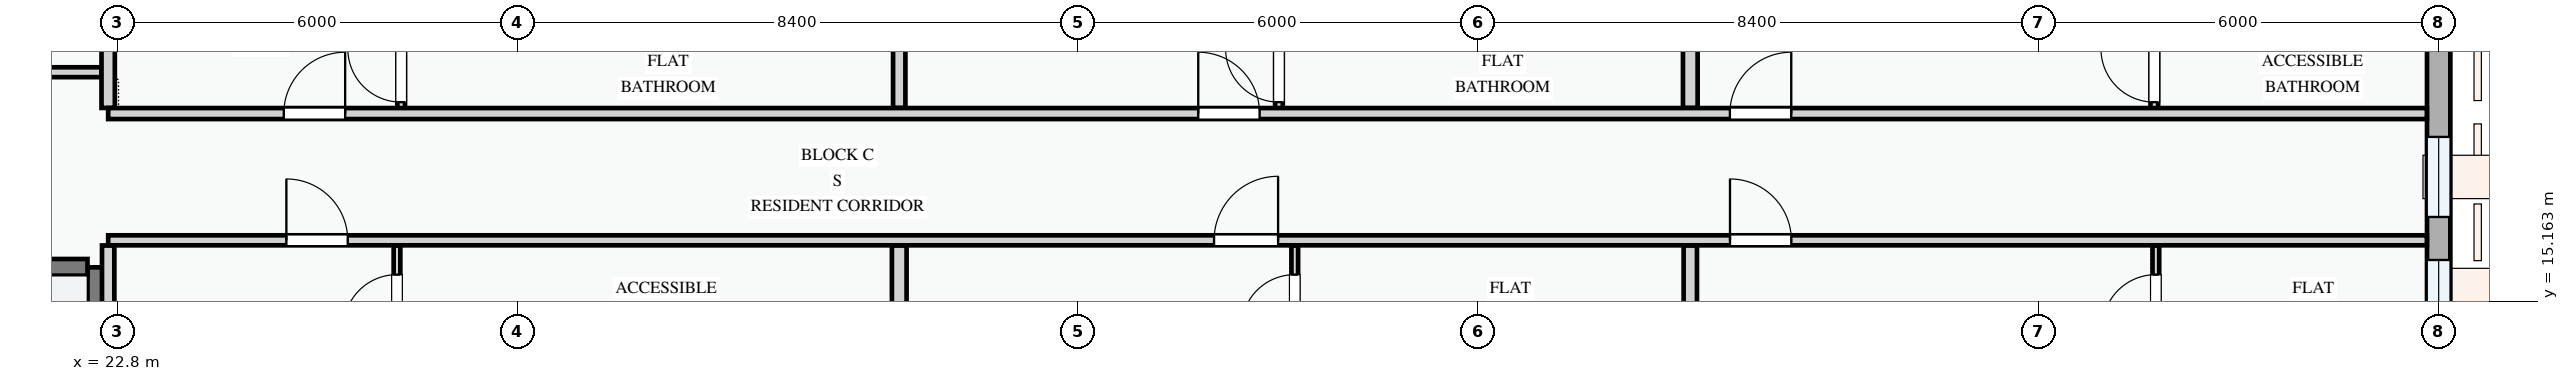
"""IFC4 building model, lengths in metres.
Left out: names, types, materials, properties, quantities, classifications, styles, units other than length and angle.
Written with IfcOpenShell. Run it as: python <this file> out.ifc"""

import sys

from ifc_helpers import new_model, si_unit, direction, frame, frame_2d, origin, place, context, subcontext, project, spatial, rectangle, extrude, element, fill, save


model = new_model("IFC4")
c1 = context("Model", 3, precision=1e-05, world=origin(), true_north=direction((0.0, 1.0)))
c2 = subcontext(c1, "Body", "Model", "MODEL_VIEW")
j1 = project(units=[si_unit("LENGTHUNIT", "METRE"), si_unit("PLANEANGLEUNIT", "RADIAN")], contexts=[c1])
p1 = place(None, origin())
s1 = spatial("IfcSite", under=j1, at=p1, CompositionType="ELEMENT")
p2 = place(p1, origin())
s2 = spatial("IfcBuilding", under=s1, at=p2, CompositionType="ELEMENT")
p3 = place(p2, frame((0.0, 0.0, 8.1)))
s3 = spatial("IfcBuildingStorey", under=s2, at=p3, CompositionType="ELEMENT", Elevation=8.1)
p4 = place(p3, frame((57.6, 14.4, 0.0), z_axis=(0.0, 0.0, 1.0), x_axis=(0.0, 1.0, 0.0)))
e1 = element("IfcWall", 1, at=p4, inside=s3, PredefinedType="STANDARD", context=c2, shape_type="SweptSolid", body=[
    extrude(rectangle(XDim=8.4, YDim=0.35, at=frame_2d((4.2, 0.0))), origin(), (0.0, 0.0, 1.0), 2.425),
])
p5 = place(p4, frame((0.485, 0.0, 0.78)))
e2 = element("IfcOpeningElement", 2, at=p5, cuts=e1, PredefinedType="OPENING", context=c2, shape_type="SweptSolid", body=[
    extrude(rectangle(XDim=0.9, YDim=1.2, at=frame_2d((0.45, 0.6))), frame((0.0, 0.185, 0.0), z_axis=(0.0, -1.0, 0.0), x_axis=(1.0, 0.0, 0.0)), (0.0, 0.0, 1.0), 0.37),
])
p6 = place(p4, frame((2.03, 0.0, 0.78)))
e3 = element("IfcOpeningElement", 3, at=p6, cuts=e1, PredefinedType="OPENING", context=c2, shape_type="SweptSolid", body=[
    extrude(rectangle(XDim=1.2, YDim=1.5, at=frame_2d((0.6, 0.75))), frame((0.0, 0.185, 0.0), z_axis=(0.0, -1.0, 0.0), x_axis=(1.0, 0.0, 0.0)), (0.0, 0.0, 1.0), 0.37),
])
p7 = place(p4, frame((6.658, 0.0, 0.78)))
e4 = element("IfcOpeningElement", 4, at=p7, cuts=e1, PredefinedType="OPENING", context=c2, shape_type="SweptSolid", body=[
    extrude(rectangle(XDim=0.95, YDim=1.15, at=frame_2d((0.475, 0.575))), frame((0.0, 0.185, 0.0), z_axis=(0.0, -1.0, 0.0), x_axis=(1.0, 0.0, 0.0)), (0.0, 0.0, 1.0), 0.37),
])
p8 = place(p3, frame((22.475, 8.75, 0.0), z_axis=(0.0, 0.0, 1.0), x_axis=(0.0, 1.0, 0.0)))
e5 = element("IfcWall", 5, at=p8, inside=s3, PredefinedType="SHEAR", context=c2, shape_type="SweptSolid", body=[
    extrude(rectangle(XDim=6.925, YDim=0.25, at=frame_2d((3.462, 0.0))), origin(), (0.0, 0.0, 1.0), 3.0),
])
p9 = place(p3, frame((8.85, 15.675, 0.0), z_axis=(0.0, 0.0, 1.0), x_axis=(1.0, 0.0, 0.0)))
e6 = element("IfcWall", 6, at=p9, inside=s3, PredefinedType="SHEAR", context=c2, shape_type="SweptSolid", body=[
    extrude(rectangle(XDim=13.5, YDim=0.25, at=frame_2d((6.75, 0.0))), origin(), (0.0, 0.0, 1.0), 3.0),
])
p10 = place(p9, frame((6.2, 0.0, 0.0)))
e7 = element("IfcOpeningElement", 7, at=p10, cuts=e6, PredefinedType="OPENING", context=c2, shape_type="SweptSolid", body=[
    extrude(rectangle(XDim=1.1, YDim=2.15, at=frame_2d((0.55, 1.075))), frame((0.0, 0.135, 0.0), z_axis=(0.0, -1.0, 0.0), x_axis=(1.0, 0.0, 0.0)), (0.0, 0.0, 1.0), 0.27),
])
p11 = place(p3, frame((18.025, 18.6, 0.0), z_axis=(0.0, 0.0, 1.0), x_axis=(1.0, 0.0, 0.0)))
e8 = element("IfcWall", 8, at=p11, inside=s3, PredefinedType="PARTITIONING", context=c2, shape_type="SweptSolid", body=[
    extrude(rectangle(XDim=4.533, YDim=0.148, at=frame_2d((2.267, 0.0))), origin(), (0.0, 0.0, 1.0), 3.0),
])
p12 = place(p11, frame((1.65, 0.0, 0.0)))
e9 = element("IfcOpeningElement", 9, at=p12, cuts=e8, PredefinedType="OPENING", context=c2, shape_type="SweptSolid", body=[
    extrude(rectangle(XDim=1.0, YDim=2.15, at=frame_2d((0.5, 1.075))), frame((0.0, 0.084, 0.0), z_axis=(0.0, -1.0, 0.0), x_axis=(1.0, 0.0, 0.0)), (0.0, 0.0, 1.0), 0.168),
])
p13 = place(p3, frame((26.99, 8.577, 0.0), z_axis=(0.0, 0.0, 1.0), x_axis=(0.0, 1.0, 0.0)))
e10 = element("IfcWall", 10, at=p13, inside=s3, PredefinedType="PARTITIONING", context=c2, shape_type="SweptSolid", body=[
    extrude(rectangle(XDim=7.426, YDim=0.1, at=frame_2d((3.713, 0.0))), origin(), (0.0, 0.0, 1.0), 3.0),
])
p14 = place(p13, frame((1.287, 0.0, 0.0)))
e11 = element("IfcOpeningElement", 11, at=p14, cuts=e10, PredefinedType="OPENING", context=c2, shape_type="SweptSolid", body=[
    extrude(rectangle(XDim=0.85, YDim=2.1, at=frame_2d((0.425, 1.05))), frame((0.0, 0.06, 0.0), z_axis=(0.0, -1.0, 0.0), x_axis=(1.0, 0.0, 0.0)), (0.0, 0.0, 1.0), 0.12),
])
p15 = place(p13, frame((4.182, 0.0, 0.0)))
e12 = element("IfcOpeningElement", 12, at=p15, cuts=e10, PredefinedType="OPENING", context=c2, shape_type="SweptSolid", body=[
    extrude(rectangle(XDim=0.85, YDim=2.1, at=frame_2d((0.425, 1.05))), frame((0.0, 0.06, 0.0), z_axis=(0.0, -1.0, 0.0), x_axis=(1.0, 0.0, 0.0)), (0.0, 0.0, 1.0), 0.12),
])
p16 = place(p13, frame((6.189, 0.0, 0.0)))
e13 = element("IfcOpeningElement", 13, at=p16, cuts=e10, PredefinedType="OPENING", context=c2, shape_type="SweptSolid", body=[
    extrude(rectangle(XDim=0.8, YDim=2.1, at=frame_2d((0.4, 1.05))), frame((0.0, 0.06, 0.0), z_axis=(0.0, -1.0, 0.0), x_axis=(1.0, 0.0, 0.0)), (0.0, 0.0, 1.0), 0.12),
])
p17 = place(p3, frame((27.053, 17.98, 0.0), z_axis=(0.0, 0.0, 1.0), x_axis=(0.0, 1.0, 0.0)))
e14 = element("IfcWall", 14, at=p17, inside=s3, PredefinedType="PARTITIONING", context=c2, shape_type="SweptSolid", body=[
    extrude(rectangle(XDim=4.643, YDim=0.115, at=frame_2d((2.322, 0.0))), origin(), (0.0, 0.0, 1.0), 3.0),
])
p18 = place(p17, frame((0.171, 0.0, 0.0)))
e15 = element("IfcOpeningElement", 15, at=p18, cuts=e14, PredefinedType="OPENING", context=c2, shape_type="SweptSolid", body=[
    extrude(rectangle(XDim=0.8, YDim=2.1, at=frame_2d((0.4, 1.05))), frame((0.0, 0.067, 0.0), z_axis=(0.0, -1.0, 0.0), x_axis=(1.0, 0.0, 0.0)), (0.0, 0.0, 1.0), 0.135),
])
p19 = place(p17, frame((1.384, 0.0, 0.0)))
e16 = element("IfcOpeningElement", 16, at=p19, cuts=e14, PredefinedType="OPENING", context=c2, shape_type="SweptSolid", body=[
    extrude(rectangle(XDim=0.85, YDim=2.1, at=frame_2d((0.425, 1.05))), frame((0.0, 0.067, 0.0), z_axis=(0.0, -1.0, 0.0), x_axis=(1.0, 0.0, 0.0)), (0.0, 0.0, 1.0), 0.135),
])
p20 = place(p17, frame((3.193, 0.0, 0.0)))
e17 = element("IfcOpeningElement", 17, at=p20, cuts=e14, PredefinedType="OPENING", context=c2, shape_type="SweptSolid", body=[
    extrude(rectangle(XDim=0.85, YDim=2.1, at=frame_2d((0.425, 1.05))), frame((0.0, 0.067, 0.0), z_axis=(0.0, -1.0, 0.0), x_axis=(1.0, 0.0, 0.0)), (0.0, 0.0, 1.0), 0.135),
])
p21 = place(p3, frame((22.66, 8.577, 0.0), z_axis=(0.0, 0.0, 1.0), x_axis=(0.0, 1.0, 0.0)))
e18 = element("IfcWall", 18, at=p21, inside=s3, PredefinedType="PARTITIONING", context=c2, shape_type="SweptSolid", body=[
    extrude(rectangle(XDim=7.426, YDim=0.185, at=frame_2d((3.713, 0.0))), origin(), (0.0, 0.0, 1.0), 2.425),
])
p22 = place(p3, frame((22.66, 18.064, 0.0), z_axis=(0.0, 0.0, 1.0), x_axis=(0.0, 1.0, 0.0)))
e19 = element("IfcWall", 19, at=p22, inside=s3, PredefinedType="PARTITIONING", context=c2, shape_type="SweptSolid", body=[
    extrude(rectangle(XDim=4.676, YDim=0.2, at=frame_2d((2.338, 0.0))), origin(), (0.0, 0.0, 1.0), 2.425),
])
p23 = place(p3, frame((40.45, 8.577, 0.0), z_axis=(0.0, 0.0, 1.0), x_axis=(0.0, 1.0, 0.0)))
e20 = element("IfcWall", 20, at=p23, inside=s3, PredefinedType="PARTITIONING", context=c2, shape_type="SweptSolid", body=[
    extrude(rectangle(XDim=7.426, YDim=0.1, at=frame_2d((3.713, 0.0))), origin(), (0.0, 0.0, 1.0), 3.0),
])
p24 = place(p23, frame((1.287, 0.0, 0.0)))
e21 = element("IfcOpeningElement", 21, at=p24, cuts=e20, PredefinedType="OPENING", context=c2, shape_type="SweptSolid", body=[
    extrude(rectangle(XDim=0.82, YDim=2.08, at=frame_2d((0.41, 1.04))), frame((0.0, 0.06, 0.0), z_axis=(0.0, -1.0, 0.0), x_axis=(1.0, 0.0, 0.0)), (0.0, 0.0, 1.0), 0.12),
])
p25 = place(p23, frame((4.182, 0.0, 0.0)))
e22 = element("IfcOpeningElement", 22, at=p25, cuts=e20, PredefinedType="OPENING", context=c2, shape_type="SweptSolid", body=[
    extrude(rectangle(XDim=0.85, YDim=2.1, at=frame_2d((0.425, 1.05))), frame((0.0, 0.06, 0.0), z_axis=(0.0, -1.0, 0.0), x_axis=(1.0, 0.0, 0.0)), (0.0, 0.0, 1.0), 0.12),
])
p26 = place(p23, frame((6.189, 0.0, 0.0)))
e23 = element("IfcOpeningElement", 23, at=p26, cuts=e20, PredefinedType="OPENING", context=c2, shape_type="SweptSolid", body=[
    extrude(rectangle(XDim=0.8, YDim=2.1, at=frame_2d((0.4, 1.05))), frame((0.0, 0.06, 0.0), z_axis=(0.0, -1.0, 0.0), x_axis=(1.0, 0.0, 0.0)), (0.0, 0.0, 1.0), 0.12),
])
p27 = place(p3, frame((40.213, 17.98, 0.0), z_axis=(0.0, 0.0, 1.0), x_axis=(0.0, 1.0, 0.0)))
e24 = element("IfcWall", 24, at=p27, inside=s3, PredefinedType="PARTITIONING", context=c2, shape_type="SweptSolid", body=[
    extrude(rectangle(XDim=4.643, YDim=0.115, at=frame_2d((2.322, 0.0))), origin(), (0.0, 0.0, 1.0), 3.0),
])
p28 = place(p27, frame((0.171, 0.0, 0.0)))
e25 = element("IfcOpeningElement", 25, at=p28, cuts=e24, PredefinedType="OPENING", context=c2, shape_type="SweptSolid", body=[
    extrude(rectangle(XDim=0.8, YDim=2.1, at=frame_2d((0.4, 1.05))), frame((0.0, 0.067, 0.0), z_axis=(0.0, -1.0, 0.0), x_axis=(1.0, 0.0, 0.0)), (0.0, 0.0, 1.0), 0.135),
])
p29 = place(p27, frame((1.384, 0.0, 0.0)))
e26 = element("IfcOpeningElement", 26, at=p29, cuts=e24, PredefinedType="OPENING", context=c2, shape_type="SweptSolid", body=[
    extrude(rectangle(XDim=0.82, YDim=2.08, at=frame_2d((0.41, 1.04))), frame((0.0, 0.067, 0.0), z_axis=(0.0, -1.0, 0.0), x_axis=(1.0, 0.0, 0.0)), (0.0, 0.0, 1.0), 0.135),
])
p30 = place(p27, frame((3.193, 0.0, 0.0)))
e27 = element("IfcOpeningElement", 27, at=p30, cuts=e24, PredefinedType="OPENING", context=c2, shape_type="SweptSolid", body=[
    extrude(rectangle(XDim=0.85, YDim=2.1, at=frame_2d((0.425, 1.05))), frame((0.0, 0.067, 0.0), z_axis=(0.0, -1.0, 0.0), x_axis=(1.0, 0.0, 0.0)), (0.0, 0.0, 1.0), 0.135),
])
p31 = place(p3, frame((34.52, 8.577, 0.0), z_axis=(0.0, 0.0, 1.0), x_axis=(0.0, 1.0, 0.0)))
e28 = element("IfcWall", 28, at=p31, inside=s3, PredefinedType="PARTITIONING", context=c2, shape_type="SweptSolid", body=[
    extrude(rectangle(XDim=7.426, YDim=0.22, at=frame_2d((3.713, 0.0))), origin(), (0.0, 0.0, 1.0), 3.0),
])
p32 = place(p3, frame((34.52, 18.064, 0.0), z_axis=(0.0, 0.0, 1.0), x_axis=(0.0, 1.0, 0.0)))
e29 = element("IfcWall", 29, at=p32, inside=s3, PredefinedType="PARTITIONING", context=c2, shape_type="SweptSolid", body=[
    extrude(rectangle(XDim=4.559, YDim=0.185, at=frame_2d((2.279, 0.0))), origin(), (0.0, 0.0, 1.0), 3.0),
])
p33 = place(p3, frame((53.36, 8.577, 0.0), z_axis=(0.0, 0.0, 1.0), x_axis=(0.0, 1.0, 0.0)))
e30 = element("IfcWall", 30, at=p33, inside=s3, PredefinedType="PARTITIONING", context=c2, shape_type="SweptSolid", body=[
    extrude(rectangle(XDim=7.426, YDim=0.1, at=frame_2d((3.713, 0.0))), origin(), (0.0, 0.0, 1.0), 3.0),
])
p34 = place(p33, frame((1.287, 0.0, 0.0)))
e31 = element("IfcOpeningElement", 31, at=p34, cuts=e30, PredefinedType="OPENING", context=c2, shape_type="SweptSolid", body=[
    extrude(rectangle(XDim=0.85, YDim=2.1, at=frame_2d((0.425, 1.05))), frame((0.0, 0.06, 0.0), z_axis=(0.0, -1.0, 0.0), x_axis=(1.0, 0.0, 0.0)), (0.0, 0.0, 1.0), 0.12),
])
p35 = place(p33, frame((4.182, 0.0, 0.0)))
e32 = element("IfcOpeningElement", 32, at=p35, cuts=e30, PredefinedType="OPENING", context=c2, shape_type="SweptSolid", body=[
    extrude(rectangle(XDim=0.85, YDim=2.1, at=frame_2d((0.425, 1.05))), frame((0.0, 0.06, 0.0), z_axis=(0.0, -1.0, 0.0), x_axis=(1.0, 0.0, 0.0)), (0.0, 0.0, 1.0), 0.12),
])
p36 = place(p33, frame((6.189, 0.0, 0.0)))
e33 = element("IfcOpeningElement", 33, at=p36, cuts=e30, PredefinedType="OPENING", context=c2, shape_type="SweptSolid", body=[
    extrude(rectangle(XDim=0.8, YDim=2.1, at=frame_2d((0.4, 1.05))), frame((0.0, 0.06, 0.0), z_axis=(0.0, -1.0, 0.0), x_axis=(1.0, 0.0, 0.0)), (0.0, 0.0, 1.0), 0.12),
])
p37 = place(p3, frame((53.337, 17.98, 0.0), z_axis=(0.0, 0.0, 1.0), x_axis=(0.0, 1.0, 0.0)))
e34 = element("IfcWall", 34, at=p37, inside=s3, PredefinedType="PARTITIONING", context=c2, shape_type="SweptSolid", body=[
    extrude(rectangle(XDim=4.643, YDim=0.115, at=frame_2d((2.322, 0.0))), origin(), (0.0, 0.0, 1.0), 3.0),
])
p38 = place(p37, frame((0.171, 0.0, 0.0)))
e35 = element("IfcOpeningElement", 35, at=p38, cuts=e34, PredefinedType="OPENING", context=c2, shape_type="SweptSolid", body=[
    extrude(rectangle(XDim=0.8, YDim=2.1, at=frame_2d((0.4, 1.05))), frame((0.0, 0.067, 0.0), z_axis=(0.0, -1.0, 0.0), x_axis=(1.0, 0.0, 0.0)), (0.0, 0.0, 1.0), 0.135),
])
p39 = place(p37, frame((1.384, 0.0, 0.0)))
e36 = element("IfcOpeningElement", 36, at=p39, cuts=e34, PredefinedType="OPENING", context=c2, shape_type="SweptSolid", body=[
    extrude(rectangle(XDim=0.85, YDim=2.1, at=frame_2d((0.425, 1.05))), frame((0.0, 0.067, 0.0), z_axis=(0.0, -1.0, 0.0), x_axis=(1.0, 0.0, 0.0)), (0.0, 0.0, 1.0), 0.135),
])
p40 = place(p37, frame((3.193, 0.0, 0.0)))
e37 = element("IfcOpeningElement", 37, at=p40, cuts=e34, PredefinedType="OPENING", context=c2, shape_type="SweptSolid", body=[
    extrude(rectangle(XDim=0.85, YDim=2.1, at=frame_2d((0.425, 1.05))), frame((0.0, 0.067, 0.0), z_axis=(0.0, -1.0, 0.0), x_axis=(1.0, 0.0, 0.0)), (0.0, 0.0, 1.0), 0.135),
])
p41 = place(p3, frame((46.38, 8.577, 0.0), z_axis=(0.0, 0.0, 1.0), x_axis=(0.0, 1.0, 0.0)))
e38 = element("IfcWall", 38, at=p41, inside=s3, PredefinedType="PARTITIONING", context=c2, shape_type="SweptSolid", body=[
    extrude(rectangle(XDim=7.426, YDim=0.2, at=frame_2d((3.713, 0.0))), origin(), (0.0, 0.0, 1.0), 3.0),
])
p42 = place(p3, frame((46.38, 18.064, 0.0), z_axis=(0.0, 0.0, 1.0), x_axis=(0.0, 1.0, 0.0)))
e39 = element("IfcWall", 39, at=p42, inside=s3, PredefinedType="PARTITIONING", context=c2, shape_type="SweptSolid", body=[
    extrude(rectangle(XDim=4.559, YDim=0.22, at=frame_2d((2.279, 0.0))), origin(), (0.0, 0.0, 1.0), 3.0),
])
p43 = place(p3, frame((22.66, 16.08, 0.0), z_axis=(0.0, 0.0, 1.0), x_axis=(1.0, 0.0, 0.0)))
e40 = element("IfcWall", 40, at=p43, inside=s3, PredefinedType="PARTITIONING", context=c2, shape_type="SweptSolid", body=[
    extrude(rectangle(XDim=34.763, YDim=0.15, at=frame_2d((17.382, 0.0))), origin(), (0.0, 0.0, 1.0), 3.0),
])
p44 = place(p43, frame((2.672, 0.0, 0.0)))
e41 = element("IfcOpeningElement", 41, at=p44, cuts=e40, PredefinedType="OPENING", context=c2, shape_type="SweptSolid", body=[
    extrude(rectangle(XDim=0.92, YDim=2.1, at=frame_2d((0.46, 1.05))), frame((0.0, 0.085, 0.0), z_axis=(0.0, -1.0, 0.0), x_axis=(1.0, 0.0, 0.0)), (0.0, 0.0, 1.0), 0.17),
])
p45 = place(p43, frame((16.58, 0.0, 0.0)))
e42 = element("IfcOpeningElement", 42, at=p45, cuts=e40, PredefinedType="OPENING", context=c2, shape_type="SweptSolid", body=[
    extrude(rectangle(XDim=0.96, YDim=2.12, at=frame_2d((0.48, 1.06))), frame((0.0, 0.085, 0.0), z_axis=(0.0, -1.0, 0.0), x_axis=(1.0, 0.0, 0.0)), (0.0, 0.0, 1.0), 0.17),
])
p46 = place(p43, frame((24.315, 0.0, 0.0)))
e43 = element("IfcOpeningElement", 43, at=p46, cuts=e40, PredefinedType="OPENING", context=c2, shape_type="SweptSolid", body=[
    extrude(rectangle(XDim=0.92, YDim=2.1, at=frame_2d((0.46, 1.05))), frame((0.0, 0.085, 0.0), z_axis=(0.0, -1.0, 0.0), x_axis=(1.0, 0.0, 0.0)), (0.0, 0.0, 1.0), 0.17),
])
p47 = place(p3, frame((22.66, 17.98, 0.0), z_axis=(0.0, 0.0, 1.0), x_axis=(1.0, 0.0, 0.0)))
e44 = element("IfcWall", 44, at=p47, inside=s3, PredefinedType="PARTITIONING", context=c2, shape_type="SweptSolid", body=[
    extrude(rectangle(XDim=34.763, YDim=0.165, at=frame_2d((17.382, 0.0))), origin(), (0.0, 0.0, 1.0), 3.0),
])
p48 = place(p47, frame((2.633, 0.0, 0.0)))
e45 = element("IfcOpeningElement", 45, at=p48, cuts=e44, PredefinedType="OPENING", context=c2, shape_type="SweptSolid", body=[
    extrude(rectangle(XDim=0.92, YDim=2.1, at=frame_2d((0.46, 1.05))), frame((0.0, 0.093, 0.0), z_axis=(0.0, -1.0, 0.0), x_axis=(1.0, 0.0, 0.0)), (0.0, 0.0, 1.0), 0.185),
])
p49 = place(p47, frame((16.343, 0.0, 0.0)))
e46 = element("IfcOpeningElement", 46, at=p49, cuts=e44, PredefinedType="OPENING", context=c2, shape_type="SweptSolid", body=[
    extrude(rectangle(XDim=0.92, YDim=2.1, at=frame_2d((0.46, 1.05))), frame((0.0, 0.093, 0.0), z_axis=(0.0, -1.0, 0.0), x_axis=(1.0, 0.0, 0.0)), (0.0, 0.0, 1.0), 0.185),
])
p50 = place(p47, frame((24.313, 0.0, 0.0)))
e47 = element("IfcOpeningElement", 47, at=p50, cuts=e44, PredefinedType="OPENING", context=c2, shape_type="SweptSolid", body=[
    extrude(rectangle(XDim=0.92, YDim=2.1, at=frame_2d((0.46, 1.05))), frame((0.0, 0.093, 0.0), z_axis=(0.0, -1.0, 0.0), x_axis=(1.0, 0.0, 0.0)), (0.0, 0.0, 1.0), 0.185),
])
p51 = place(p5, origin())
e48 = element("IfcWindow", 48, at=p51, inside=s3, PartitioningType="SINGLE_PANEL", PredefinedType="WINDOW", context=c2, shape_type="SweptSolid", body=[
    extrude(rectangle(XDim=0.9, YDim=1.2, at=frame_2d((0.45, 0.6))), frame((0.0, 0.03, 0.0), z_axis=(0.0, -1.0, 0.0), x_axis=(1.0, 0.0, 0.0)), (0.0, 0.0, 1.0), 0.06),
])
fill(e2, e48)
p52 = place(p6, origin())
e49 = element("IfcWindow", 49, at=p52, inside=s3, PartitioningType="SINGLE_PANEL", PredefinedType="WINDOW", context=c2, shape_type="SweptSolid", body=[
    extrude(rectangle(XDim=1.2, YDim=1.5, at=frame_2d((0.6, 0.75))), frame((0.0, 0.03, 0.0), z_axis=(0.0, -1.0, 0.0), x_axis=(1.0, 0.0, 0.0)), (0.0, 0.0, 1.0), 0.06),
])
fill(e3, e49)
p53 = place(p16, origin())
e50 = element("IfcDoor", 50, at=p53, inside=s3, OperationType="SINGLE_SWING_LEFT", PredefinedType="DOOR", context=c2, shape_type="SweptSolid", body=[
    extrude(rectangle(XDim=0.8, YDim=2.1, at=frame_2d((0.4, 1.05))), frame((0.0, 0.025, 0.0), z_axis=(0.0, -1.0, 0.0), x_axis=(1.0, 0.0, 0.0)), (0.0, 0.0, 1.0), 0.05),
])
fill(e13, e50)
p54 = place(p18, origin())
e51 = element("IfcDoor", 51, at=p54, inside=s3, OperationType="SINGLE_SWING_RIGHT", PredefinedType="DOOR", context=c2, shape_type="SweptSolid", body=[
    extrude(rectangle(XDim=0.8, YDim=2.1, at=frame_2d((0.4, 1.05))), frame((0.0, 0.025, 0.0), z_axis=(0.0, -1.0, 0.0), x_axis=(1.0, 0.0, 0.0)), (0.0, 0.0, 1.0), 0.05),
])
fill(e15, e51)
p55 = place(p26, origin())
e52 = element("IfcDoor", 52, at=p55, inside=s3, OperationType="SINGLE_SWING_LEFT", PredefinedType="DOOR", context=c2, shape_type="SweptSolid", body=[
    extrude(rectangle(XDim=0.8, YDim=2.1, at=frame_2d((0.4, 1.05))), frame((0.0, 0.025, 0.0), z_axis=(0.0, -1.0, 0.0), x_axis=(1.0, 0.0, 0.0)), (0.0, 0.0, 1.0), 0.05),
])
fill(e23, e52)
p56 = place(p28, origin())
e53 = element("IfcDoor", 53, at=p56, inside=s3, OperationType="SINGLE_SWING_RIGHT", PredefinedType="DOOR", context=c2, shape_type="SweptSolid", body=[
    extrude(rectangle(XDim=0.8, YDim=2.1, at=frame_2d((0.4, 1.05))), frame((0.0, 0.025, 0.0), z_axis=(0.0, -1.0, 0.0), x_axis=(1.0, 0.0, 0.0)), (0.0, 0.0, 1.0), 0.05),
])
fill(e25, e53)
p57 = place(p36, origin())
e54 = element("IfcDoor", 54, at=p57, inside=s3, OperationType="SINGLE_SWING_LEFT", PredefinedType="DOOR", context=c2, shape_type="SweptSolid", body=[
    extrude(rectangle(XDim=0.8, YDim=2.1, at=frame_2d((0.4, 1.05))), frame((0.0, 0.025, 0.0), z_axis=(0.0, -1.0, 0.0), x_axis=(1.0, 0.0, 0.0)), (0.0, 0.0, 1.0), 0.05),
])
fill(e33, e54)
p58 = place(p38, origin())
e55 = element("IfcDoor", 55, at=p58, inside=s3, OperationType="SINGLE_SWING_RIGHT", PredefinedType="DOOR", context=c2, shape_type="SweptSolid", body=[
    extrude(rectangle(XDim=0.8, YDim=2.1, at=frame_2d((0.4, 1.05))), frame((0.0, 0.025, 0.0), z_axis=(0.0, -1.0, 0.0), x_axis=(1.0, 0.0, 0.0)), (0.0, 0.0, 1.0), 0.05),
])
fill(e35, e55)
p59 = place(p44, origin())
e56 = element("IfcDoor", 56, at=p59, inside=s3, OperationType="SINGLE_SWING_LEFT", PredefinedType="DOOR", context=c2, shape_type="SweptSolid", body=[
    extrude(rectangle(XDim=0.92, YDim=2.1, at=frame_2d((0.46, 1.05))), frame((0.0, 0.025, 0.0), z_axis=(0.0, -1.0, 0.0), x_axis=(1.0, 0.0, 0.0)), (0.0, 0.0, 1.0), 0.05),
])
fill(e41, e56)
p60 = place(p45, origin())
e57 = element("IfcDoor", 57, at=p60, inside=s3, OperationType="SINGLE_SWING_RIGHT", PredefinedType="DOOR", context=c2, shape_type="SweptSolid", body=[
    extrude(rectangle(XDim=0.96, YDim=2.12, at=frame_2d((0.48, 1.06))), frame((0.0, 0.025, 0.0), z_axis=(0.0, -1.0, 0.0), x_axis=(1.0, 0.0, 0.0)), (0.0, 0.0, 1.0), 0.05),
])
fill(e42, e57)
p61 = place(p46, origin())
e58 = element("IfcDoor", 58, at=p61, inside=s3, OperationType="SINGLE_SWING_LEFT", PredefinedType="DOOR", context=c2, shape_type="SweptSolid", body=[
    extrude(rectangle(XDim=0.92, YDim=2.1, at=frame_2d((0.46, 1.05))), frame((0.0, 0.025, 0.0), z_axis=(0.0, -1.0, 0.0), x_axis=(1.0, 0.0, 0.0)), (0.0, 0.0, 1.0), 0.05),
])
fill(e43, e58)
p62 = place(p48, origin())
e59 = element("IfcDoor", 59, at=p62, inside=s3, OperationType="SINGLE_SWING_RIGHT", PredefinedType="DOOR", context=c2, shape_type="SweptSolid", body=[
    extrude(rectangle(XDim=0.92, YDim=2.1, at=frame_2d((0.46, 1.05))), frame((0.0, 0.025, 0.0), z_axis=(0.0, -1.0, 0.0), x_axis=(1.0, 0.0, 0.0)), (0.0, 0.0, 1.0), 0.05),
])
fill(e45, e59)
p63 = place(p49, origin())
e60 = element("IfcDoor", 60, at=p63, inside=s3, OperationType="SINGLE_SWING_LEFT", PredefinedType="DOOR", context=c2, shape_type="SweptSolid", body=[
    extrude(rectangle(XDim=0.92, YDim=2.1, at=frame_2d((0.46, 1.05))), frame((0.0, 0.025, 0.0), z_axis=(0.0, -1.0, 0.0), x_axis=(1.0, 0.0, 0.0)), (0.0, 0.0, 1.0), 0.05),
])
fill(e46, e60)
p64 = place(p50, origin())
e61 = element("IfcDoor", 61, at=p64, inside=s3, OperationType="SINGLE_SWING_RIGHT", PredefinedType="DOOR", context=c2, shape_type="SweptSolid", body=[
    extrude(rectangle(XDim=0.92, YDim=2.1, at=frame_2d((0.46, 1.05))), frame((0.0, 0.025, 0.0), z_axis=(0.0, -1.0, 0.0), x_axis=(1.0, 0.0, 0.0)), (0.0, 0.0, 1.0), 0.05),
])
fill(e47, e61)
save(model, sys.argv[1])
